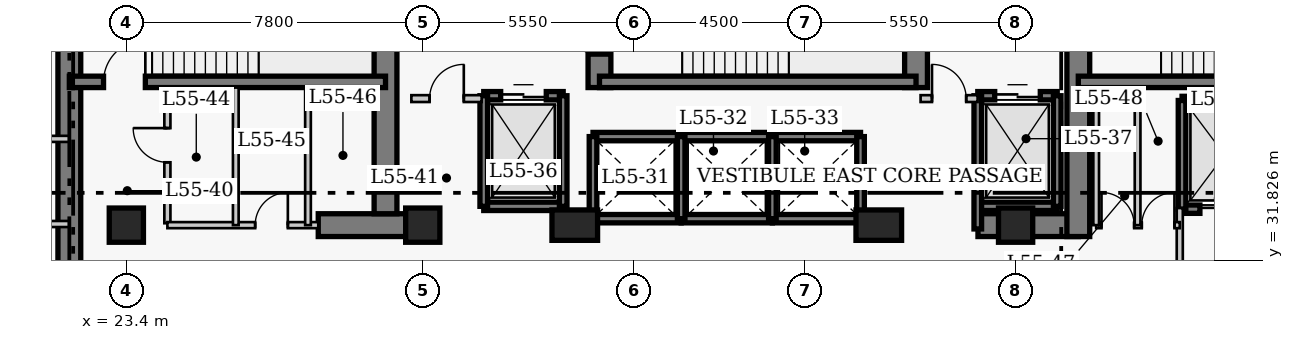
"""IFC4 building model, lengths in metres.
Left out: names, types, materials, properties, quantities, classifications, styles, units other than length and angle.
Written with IfcOpenShell. Run it as: python <this file> out.ifc"""

import sys

from ifc_helpers import new_model, si_unit, direction, frame, frame_2d, origin, origin_2d, place, context, subcontext, project, spatial, rectangle, extrude, element, fill, save


model = new_model("IFC4")
c1 = context("Model", 3, precision=1e-05, world=origin(), true_north=direction((0.0, 1.0)))
c2 = subcontext(c1, "Body", "Model", "MODEL_VIEW")
j1 = project(units=[si_unit("LENGTHUNIT", "METRE"), si_unit("PLANEANGLEUNIT", "RADIAN")], contexts=[c1])
p1 = place(None, origin())
s1 = spatial("IfcSite", under=j1, at=p1, CompositionType="ELEMENT")
p2 = place(p1, origin())
s2 = spatial("IfcBuilding", under=s1, at=p2, CompositionType="ELEMENT")
p3 = place(p2, frame((0.0, 0.0, 220.2)))
s3 = spatial("IfcBuildingStorey", under=s2, at=p3, CompositionType="ELEMENT", Elevation=220.2)
p4 = place(p3, frame((21.9, 27.05, 0.0), z_axis=(0.0, 0.0, 1.0), x_axis=(0.0, 1.0, 0.0)))
e1 = element("IfcWall", 1, at=p4, inside=s3, PredefinedType="SHEAR", context=c2, shape_type="SweptSolid", body=[
    extrude(rectangle(XDim=13.57, YDim=0.6, at=frame_2d((6.785, 0.0))), origin(), (0.0, 0.0, 1.0), 3.9),
])
p5 = place(p3, frame((28.45, 32.75, 0.0), z_axis=(0.0, 0.0, 1.0), x_axis=(1.0, 0.0, 0.0)))
e2 = element("IfcWall", 2, at=p5, inside=s3, PredefinedType="SHEAR", context=c2, shape_type="SweptSolid", body=[
    extrude(rectangle(XDim=2.4, YDim=0.6, at=frame_2d((1.2, 0.0))), origin(), (0.0, 0.0, 1.0), 3.9),
])
p6 = place(p3, frame((45.81, 32.75, 0.0), z_axis=(0.0, 0.0, 1.0), x_axis=(1.0, 0.0, 0.0)))
e3 = element("IfcWall", 3, at=p6, inside=s3, PredefinedType="SHEAR", context=c2, shape_type="SweptSolid", body=[
    extrude(rectangle(XDim=2.64, YDim=0.6, at=frame_2d((1.32, 0.0))), origin(), (0.0, 0.0, 1.0), 3.9),
])
p7 = place(p3, frame((30.22, 33.05, 0.0), z_axis=(0.0, 0.0, 1.0), x_axis=(0.0, 1.0, 0.0)))
e4 = element("IfcWall", 4, at=p7, inside=s3, PredefinedType="SHEAR", context=c2, shape_type="SweptSolid", body=[
    extrude(rectangle(XDim=7.27, YDim=0.6, at=frame_2d((3.635, 0.0))), origin(), (0.0, 0.0, 1.0), 3.9),
])
p8 = place(p3, frame((35.85, 36.37, 0.0), z_axis=(0.0, 0.0, 1.0), x_axis=(0.0, 1.0, 0.0)))
e5 = element("IfcWall", 5, at=p8, inside=s3, PredefinedType="SHEAR", context=c2, shape_type="SweptSolid", body=[
    extrude(rectangle(XDim=3.95, YDim=0.6, at=frame_2d((1.975, 0.0))), origin(), (0.0, 0.0, 1.0), 3.9),
])
p9 = place(p8, frame((0.88, 0.0, 0.0)))
e6 = element("IfcOpeningElement", 6, at=p9, cuts=e5, PredefinedType="OPENING", context=c2, shape_type="SweptSolid", body=[
    extrude(rectangle(XDim=1.1, YDim=2.15, at=frame_2d((0.55, 1.075))), frame((0.0, 0.31, 0.0), z_axis=(0.0, -1.0, 0.0), x_axis=(1.0, 0.0, 0.0)), (0.0, 0.0, 1.0), 0.62),
])
p10 = place(p3, frame((44.18, 36.37, 0.0), z_axis=(0.0, 0.0, 1.0), x_axis=(0.0, 1.0, 0.0)))
e7 = element("IfcWall", 7, at=p10, inside=s3, PredefinedType="SHEAR", context=c2, shape_type="SweptSolid", body=[
    extrude(rectangle(XDim=3.95, YDim=0.6, at=frame_2d((1.975, 0.0))), origin(), (0.0, 0.0, 1.0), 3.9),
])
p11 = place(p3, frame((48.45, 32.45, 0.0), z_axis=(0.0, 0.0, 1.0), x_axis=(0.0, 1.0, 0.0)))
e8 = element("IfcWall", 8, at=p11, inside=s3, PredefinedType="SHEAR", context=c2, shape_type="SweptSolid", body=[
    extrude(rectangle(XDim=7.87, YDim=0.6, at=frame_2d((3.935, 0.0))), origin(), (0.0, 0.0, 1.0), 3.9),
])
p12 = place(p11, frame((5.75, 0.0, 0.0)))
e9 = element("IfcOpeningElement", 9, at=p12, cuts=e8, PredefinedType="OPENING", context=c2, shape_type="SweptSolid", body=[
    extrude(rectangle(XDim=1.1, YDim=2.15, at=frame_2d((0.55, 1.075))), frame((0.0, 0.31, 0.0), z_axis=(0.0, -1.0, 0.0), x_axis=(1.0, 0.0, 0.0)), (0.0, 0.0, 1.0), 0.62),
])
p13 = place(p3, frame((21.9, 36.52, 0.0), z_axis=(0.0, 0.0, 1.0), x_axis=(1.0, 0.0, 0.0)))
e10 = element("IfcWall", 10, at=p13, inside=s3, PredefinedType="SHEAR", context=c2, shape_type="SweptSolid", body=[
    extrude(rectangle(XDim=8.32, YDim=0.3, at=frame_2d((4.16, 0.0))), origin(), (0.0, 0.0, 1.0), 3.9),
])
p14 = place(p13, frame((0.9, 0.0, 0.0)))
e11 = element("IfcOpeningElement", 11, at=p14, cuts=e10, PredefinedType="OPENING", context=c2, shape_type="SweptSolid", body=[
    extrude(rectangle(XDim=1.1, YDim=2.15, at=frame_2d((0.55, 1.075))), frame((0.0, 0.16, 0.0), z_axis=(0.0, -1.0, 0.0), x_axis=(1.0, 0.0, 0.0)), (0.0, 0.0, 1.0), 0.32),
])
p15 = place(p3, frame((35.85, 36.52, 0.0), z_axis=(0.0, 0.0, 1.0), x_axis=(1.0, 0.0, 0.0)))
e12 = element("IfcWall", 12, at=p15, inside=s3, PredefinedType="SHEAR", context=c2, shape_type="SweptSolid", body=[
    extrude(rectangle(XDim=8.33, YDim=0.3, at=frame_2d((4.165, 0.0))), origin(), (0.0, 0.0, 1.0), 3.9),
])
p16 = place(p3, frame((48.45, 36.52, 0.0), z_axis=(0.0, 0.0, 1.0), x_axis=(1.0, 0.0, 0.0)))
e13 = element("IfcWall", 13, at=p16, inside=s3, PredefinedType="SHEAR", context=c2, shape_type="SweptSolid", body=[
    extrude(rectangle(XDim=8.37, YDim=0.3, at=frame_2d((4.185, 0.0))), origin(), (0.0, 0.0, 1.0), 3.9),
])
for number, where, z_axis, x_axis in (
    (14, (23.4, 32.75, 0.0), (0.0, 0.0, 1.0), (1.0, 0.0, 0.0)),
    (15, (31.2, 32.75, 0.0), (0.0, 0.0, 1.0), (1.0, 0.0, 0.0)),
):
    element("IfcColumn", number, at=place(p3, frame(where, z_axis=z_axis, x_axis=x_axis)), inside=s3, PredefinedType="COLUMN", context=c2, shape_type="SweptSolid", body=[
        extrude(rectangle(XDim=0.9, YDim=0.9, at=origin_2d()), origin(), (0.0, 0.0, 1.0), 3.9),
    ])
for number, where, z_axis, x_axis in (
    (16, (35.2, 32.75, 0.0), (0.0, 0.0, 1.0), (1.0, 0.0, 0.0)),
    (17, (43.2, 32.75, 0.0), (0.0, 0.0, 1.0), (1.0, 0.0, 0.0)),
):
    element("IfcColumn", number, at=place(p3, frame(where, z_axis=z_axis, x_axis=x_axis)), inside=s3, PredefinedType="COLUMN", context=c2, shape_type="SweptSolid", body=[
        extrude(rectangle(XDim=1.2, YDim=0.8, at=origin_2d()), origin(), (0.0, 0.0, 1.0), 3.9),
    ])
p17 = place(p3, frame((46.8, 32.75, 0.0), z_axis=(0.0, 0.0, 1.0), x_axis=(1.0, 0.0, 0.0)))
e18 = element("IfcColumn", 18, at=p17, inside=s3, PredefinedType="COLUMN", context=c2, shape_type="SweptSolid", body=[
    extrude(rectangle(XDim=0.9, YDim=0.9, at=origin_2d()), origin(), (0.0, 0.0, 1.0), 3.9),
])
for number, where, z_axis, x_axis in (
    (19, (35.68, 35.08, 0.0), (0.0, 0.0, 1.0), (1.0, 0.0, 0.0)),
    (20, (35.68, 32.92, 0.0), (0.0, 0.0, 1.0), (1.0, 0.0, 0.0)),
):
    element("IfcWall", number, at=place(p3, frame(where, z_axis=z_axis, x_axis=x_axis)), inside=s3, PredefinedType="SHEAR", context=c2, shape_type="SweptSolid", body=[
        extrude(rectangle(XDim=2.32, YDim=0.22, at=frame_2d((1.16, 0.0))), origin(), (0.0, 0.0, 1.0), 3.9),
    ])
p18 = place(p3, frame((35.68, 32.92, 0.0), z_axis=(0.0, 0.0, 1.0), x_axis=(0.0, 1.0, 0.0)))
e21 = element("IfcWall", 21, at=p18, inside=s3, PredefinedType="SHEAR", context=c2, shape_type="SweptSolid", body=[
    extrude(rectangle(XDim=2.16, YDim=0.2, at=frame_2d((1.08, 0.0))), origin(), (0.0, 0.0, 1.0), 3.9),
])
for number, where, z_axis, x_axis in (
    (22, (38.0, 35.08, 0.0), (0.0, 0.0, 1.0), (1.0, 0.0, 0.0)),
    (23, (38.0, 32.92, 0.0), (0.0, 0.0, 1.0), (1.0, 0.0, 0.0)),
):
    element("IfcWall", number, at=place(p3, frame(where, z_axis=z_axis, x_axis=x_axis)), inside=s3, PredefinedType="SHEAR", context=c2, shape_type="SweptSolid", body=[
        extrude(rectangle(XDim=2.4, YDim=0.22, at=frame_2d((1.2, 0.0))), origin(), (0.0, 0.0, 1.0), 3.9),
    ])
p19 = place(p3, frame((38.0, 32.92, 0.0), z_axis=(0.0, 0.0, 1.0), x_axis=(0.0, 1.0, 0.0)))
e24 = element("IfcWall", 24, at=p19, inside=s3, PredefinedType="SHEAR", context=c2, shape_type="SweptSolid", body=[
    extrude(rectangle(XDim=2.16, YDim=0.2, at=frame_2d((1.08, 0.0))), origin(), (0.0, 0.0, 1.0), 3.9),
])
for number, where, z_axis, x_axis in (
    (25, (40.4, 35.08, 0.0), (0.0, 0.0, 1.0), (1.0, 0.0, 0.0)),
    (26, (40.4, 32.92, 0.0), (0.0, 0.0, 1.0), (1.0, 0.0, 0.0)),
):
    element("IfcWall", number, at=place(p3, frame(where, z_axis=z_axis, x_axis=x_axis)), inside=s3, PredefinedType="SHEAR", context=c2, shape_type="SweptSolid", body=[
        extrude(rectangle(XDim=2.32, YDim=0.22, at=frame_2d((1.16, 0.0))), origin(), (0.0, 0.0, 1.0), 3.9),
    ])
for number, where, z_axis, x_axis in (
    (27, (40.4, 32.92, 0.0), (0.0, 0.0, 1.0), (0.0, 1.0, 0.0)),
    (28, (42.72, 32.92, 0.0), (0.0, 0.0, 1.0), (0.0, 1.0, 0.0)),
):
    element("IfcWall", number, at=place(p3, frame(where, z_axis=z_axis, x_axis=x_axis)), inside=s3, PredefinedType="SHEAR", context=c2, shape_type="SweptSolid", body=[
        extrude(rectangle(XDim=2.16, YDim=0.2, at=frame_2d((1.08, 0.0))), origin(), (0.0, 0.0, 1.0), 3.9),
    ])
p20 = place(p3, frame((51.18, 36.03, 0.0), z_axis=(0.0, 0.0, 1.0), x_axis=(1.0, 0.0, 0.0)))
e29 = element("IfcWall", 29, at=p20, inside=s3, PredefinedType="SHEAR", context=c2, shape_type="SweptSolid", body=[
    extrude(rectangle(XDim=2.42, YDim=0.22, at=frame_2d((1.21, 0.0))), origin(), (0.0, 0.0, 1.0), 3.9),
])
p21 = place(p3, frame((51.18, 33.17, 0.0), z_axis=(0.0, 0.0, 1.0), x_axis=(1.0, 0.0, 0.0)))
e30 = element("IfcWall", 30, at=p21, inside=s3, PredefinedType="SHEAR", context=c2, shape_type="SweptSolid", body=[
    extrude(rectangle(XDim=2.42, YDim=0.22, at=frame_2d((1.21, 0.0))), origin(), (0.0, 0.0, 1.0), 3.9),
])
p22 = place(p21, frame((0.47, 0.0, 0.0)))
e31 = element("IfcOpeningElement", 31, at=p22, cuts=e30, PredefinedType="OPENING", context=c2, shape_type="SweptSolid", body=[
    extrude(rectangle(XDim=1.3, YDim=2.15, at=frame_2d((0.65, 1.075))), frame((0.0, 0.12, 0.0), z_axis=(0.0, -1.0, 0.0), x_axis=(1.0, 0.0, 0.0)), (0.0, 0.0, 1.0), 0.24),
])
p23 = place(p3, frame((51.18, 33.17, 0.0), z_axis=(0.0, 0.0, 1.0), x_axis=(0.0, 1.0, 0.0)))
e32 = element("IfcWall", 32, at=p23, inside=s3, PredefinedType="SHEAR", context=c2, shape_type="SweptSolid", body=[
    extrude(rectangle(XDim=2.86, YDim=0.2, at=frame_2d((1.43, 0.0))), origin(), (0.0, 0.0, 1.0), 3.9),
])
p24 = place(p3, frame((32.805, 36.155, 0.0), z_axis=(0.0, 0.0, 1.0), x_axis=(1.0, 0.0, 0.0)))
e33 = element("IfcWall", 33, at=p24, inside=s3, PredefinedType="SHEAR", context=c2, shape_type="SweptSolid", body=[
    extrude(rectangle(XDim=2.09, YDim=0.22, at=frame_2d((1.045, 0.0))), origin(), (0.0, 0.0, 1.0), 3.9),
])
p25 = place(p24, frame((0.445, 0.0, 0.0)))
e34 = element("IfcOpeningElement", 34, at=p25, cuts=e33, PredefinedType="OPENING", context=c2, shape_type="SweptSolid", body=[
    extrude(rectangle(XDim=1.2, YDim=2.15, at=frame_2d((0.6, 1.075))), frame((0.0, 0.12, 0.0), z_axis=(0.0, -1.0, 0.0), x_axis=(1.0, 0.0, 0.0)), (0.0, 0.0, 1.0), 0.24),
])
p26 = place(p3, frame((32.805, 33.245, 0.0), z_axis=(0.0, 0.0, 1.0), x_axis=(1.0, 0.0, 0.0)))
e35 = element("IfcWall", 35, at=p26, inside=s3, PredefinedType="SHEAR", context=c2, shape_type="SweptSolid", body=[
    extrude(rectangle(XDim=2.09, YDim=0.22, at=frame_2d((1.045, 0.0))), origin(), (0.0, 0.0, 1.0), 3.9),
])
for number, where, z_axis, x_axis in (
    (36, (32.805, 33.245, 0.0), (0.0, 0.0, 1.0), (0.0, 1.0, 0.0)),
    (37, (34.895, 33.245, 0.0), (0.0, 0.0, 1.0), (0.0, 1.0, 0.0)),
):
    element("IfcWall", number, at=place(p3, frame(where, z_axis=z_axis, x_axis=x_axis)), inside=s3, PredefinedType="SHEAR", context=c2, shape_type="SweptSolid", body=[
        extrude(rectangle(XDim=2.91, YDim=0.2, at=frame_2d((1.455, 0.0))), origin(), (0.0, 0.0, 1.0), 3.9),
    ])
p27 = place(p3, frame((45.805, 36.155, 0.0), z_axis=(0.0, 0.0, 1.0), x_axis=(1.0, 0.0, 0.0)))
e38 = element("IfcWall", 38, at=p27, inside=s3, PredefinedType="SHEAR", context=c2, shape_type="SweptSolid", body=[
    extrude(rectangle(XDim=2.09, YDim=0.22, at=frame_2d((1.045, 0.0))), origin(), (0.0, 0.0, 1.0), 3.9),
])
p28 = place(p27, frame((0.445, 0.0, 0.0)))
e39 = element("IfcOpeningElement", 39, at=p28, cuts=e38, PredefinedType="OPENING", context=c2, shape_type="SweptSolid", body=[
    extrude(rectangle(XDim=1.2, YDim=2.15, at=frame_2d((0.6, 1.075))), frame((0.0, 0.12, 0.0), z_axis=(0.0, -1.0, 0.0), x_axis=(1.0, 0.0, 0.0)), (0.0, 0.0, 1.0), 0.24),
])
p29 = place(p3, frame((45.805, 33.245, 0.0), z_axis=(0.0, 0.0, 1.0), x_axis=(1.0, 0.0, 0.0)))
e40 = element("IfcWall", 40, at=p29, inside=s3, PredefinedType="SHEAR", context=c2, shape_type="SweptSolid", body=[
    extrude(rectangle(XDim=2.09, YDim=0.22, at=frame_2d((1.045, 0.0))), origin(), (0.0, 0.0, 1.0), 3.9),
])
p30 = place(p3, frame((45.805, 32.65, 0.0), z_axis=(0.0, 0.0, 1.0), x_axis=(0.0, 1.0, 0.0)))
e41 = element("IfcWall", 41, at=p30, inside=s3, PredefinedType="SHEAR", context=c2, shape_type="SweptSolid", body=[
    extrude(rectangle(XDim=3.505, YDim=0.2, at=frame_2d((1.752, 0.0))), origin(), (0.0, 0.0, 1.0), 3.9),
])
p31 = place(p3, frame((47.895, 33.245, 0.0), z_axis=(0.0, 0.0, 1.0), x_axis=(0.0, 1.0, 0.0)))
e42 = element("IfcWall", 42, at=p31, inside=s3, PredefinedType="SHEAR", context=c2, shape_type="SweptSolid", body=[
    extrude(rectangle(XDim=2.91, YDim=0.2, at=frame_2d((1.455, 0.0))), origin(), (0.0, 0.0, 1.0), 3.9),
])
p32 = place(p3, frame((30.9, 36.08, 0.0), z_axis=(0.0, 0.0, 1.0), x_axis=(1.0, 0.0, 0.0)))
e43 = element("IfcWall", 43, at=p32, inside=s3, PredefinedType="PARTITIONING", context=c2, shape_type="SweptSolid", body=[
    extrude(rectangle(XDim=1.85, YDim=0.18, at=frame_2d((0.925, 0.0))), origin(), (0.0, 0.0, 1.0), 3.65),
])
p33 = place(p32, frame((0.48, 0.0, 0.0)))
e44 = element("IfcOpeningElement", 44, at=p33, cuts=e43, PredefinedType="OPENING", context=c2, shape_type="SweptSolid", body=[
    extrude(rectangle(XDim=0.9, YDim=2.15, at=frame_2d((0.45, 1.075))), frame((0.0, 0.1, 0.0), z_axis=(0.0, -1.0, 0.0), x_axis=(1.0, 0.0, 0.0)), (0.0, 0.0, 1.0), 0.2),
])
p34 = place(p3, frame((44.3, 36.08, 0.0), z_axis=(0.0, 0.0, 1.0), x_axis=(1.0, 0.0, 0.0)))
e45 = element("IfcWall", 45, at=p34, inside=s3, PredefinedType="PARTITIONING", context=c2, shape_type="SweptSolid", body=[
    extrude(rectangle(XDim=1.5, YDim=0.18, at=frame_2d((0.75, 0.0))), origin(), (0.0, 0.0, 1.0), 3.65),
])
p35 = place(p34, frame((0.3, 0.0, 0.0)))
e46 = element("IfcOpeningElement", 46, at=p35, cuts=e45, PredefinedType="OPENING", context=c2, shape_type="SweptSolid", body=[
    extrude(rectangle(XDim=0.9, YDim=2.15, at=frame_2d((0.45, 1.075))), frame((0.0, 0.1, 0.0), z_axis=(0.0, -1.0, 0.0), x_axis=(1.0, 0.0, 0.0)), (0.0, 0.0, 1.0), 0.2),
])
p36 = place(p3, frame((24.48, 32.8, 0.0), z_axis=(0.0, 0.0, 1.0), x_axis=(0.0, 1.0, 0.0)))
e47 = element("IfcWall", 47, at=p36, inside=s3, PredefinedType="PARTITIONING", context=c2, shape_type="SweptSolid", body=[
    extrude(rectangle(XDim=3.57, YDim=0.16, at=frame_2d((1.785, 0.0))), origin(), (0.0, 0.0, 1.0), 3.65),
])
p37 = place(p36, frame((1.604, 0.0, 0.0)))
e48 = element("IfcOpeningElement", 48, at=p37, cuts=e47, PredefinedType="OPENING", context=c2, shape_type="SweptSolid", body=[
    extrude(rectangle(XDim=0.9, YDim=2.1, at=frame_2d((0.45, 1.05))), frame((0.0, 0.09, 0.0), z_axis=(0.0, -1.0, 0.0), x_axis=(1.0, 0.0, 0.0)), (0.0, 0.0, 1.0), 0.18),
])
p38 = place(p3, frame((51.12, 29.5, 0.0), z_axis=(0.0, 0.0, 1.0), x_axis=(0.0, 1.0, 0.0)))
e49 = element("IfcWall", 49, at=p38, inside=s3, PredefinedType="PARTITIONING", context=c2, shape_type="SweptSolid", body=[
    extrude(rectangle(XDim=3.7, YDim=0.16, at=frame_2d((1.85, 0.0))), origin(), (0.0, 0.0, 1.0), 3.65),
])
p39 = place(p38, frame((0.9, 0.0, 0.0)))
e50 = element("IfcOpeningElement", 50, at=p39, cuts=e49, PredefinedType="OPENING", context=c2, shape_type="SweptSolid", body=[
    extrude(rectangle(XDim=1.1, YDim=2.15, at=frame_2d((0.55, 1.075))), frame((0.0, 0.09, 0.0), z_axis=(0.0, -1.0, 0.0), x_axis=(1.0, 0.0, 0.0)), (0.0, 0.0, 1.0), 0.18),
])
p40 = place(p3, frame((24.48, 32.75, 0.0), z_axis=(0.0, 0.0, 1.0), x_axis=(1.0, 0.0, 0.0)))
e51 = element("IfcWall", 51, at=p40, inside=s3, PredefinedType="PARTITIONING", context=c2, shape_type="SweptSolid", body=[
    extrude(rectangle(XDim=3.97, YDim=0.16, at=frame_2d((1.985, 0.0))), origin(), (0.0, 0.0, 1.0), 3.65),
])
p41 = place(p40, frame((2.31, 0.0, 0.0)))
e52 = element("IfcOpeningElement", 52, at=p41, cuts=e51, PredefinedType="OPENING", context=c2, shape_type="SweptSolid", body=[
    extrude(rectangle(XDim=0.86, YDim=2.05, at=frame_2d((0.43, 1.025))), frame((0.0, 0.09, 0.0), z_axis=(0.0, -1.0, 0.0), x_axis=(1.0, 0.0, 0.0)), (0.0, 0.0, 1.0), 0.18),
])
p42 = place(p3, frame((48.92, 32.75, 0.0), z_axis=(0.0, 0.0, 1.0), x_axis=(1.0, 0.0, 0.0)))
e53 = element("IfcWall", 53, at=p42, inside=s3, PredefinedType="PARTITIONING", context=c2, shape_type="SweptSolid", body=[
    extrude(rectangle(XDim=2.2, YDim=0.16, at=frame_2d((1.1, 0.0))), origin(), (0.0, 0.0, 1.0), 3.65),
])
p43 = place(p42, frame((0.14, 0.0, 0.0)))
e54 = element("IfcOpeningElement", 54, at=p43, cuts=e53, PredefinedType="OPENING", context=c2, shape_type="SweptSolid", body=[
    extrude(rectangle(XDim=0.86, YDim=2.05, at=frame_2d((0.43, 1.025))), frame((0.0, 0.09, 0.0), z_axis=(0.0, -1.0, 0.0), x_axis=(1.0, 0.0, 0.0)), (0.0, 0.0, 1.0), 0.18),
])
p44 = place(p42, frame((1.2, 0.0, 0.0)))
e55 = element("IfcOpeningElement", 55, at=p44, cuts=e53, PredefinedType="OPENING", context=c2, shape_type="SweptSolid", body=[
    extrude(rectangle(XDim=0.86, YDim=2.05, at=frame_2d((0.43, 1.025))), frame((0.0, 0.09, 0.0), z_axis=(0.0, -1.0, 0.0), x_axis=(1.0, 0.0, 0.0)), (0.0, 0.0, 1.0), 0.18),
])
for number, where, z_axis, x_axis in (
    (56, (48.92, 32.75, 0.0), (0.0, 0.0, 1.0), (0.0, 1.0, 0.0)),
    (57, (26.28, 32.75, 0.0), (0.0, 0.0, 1.0), (0.0, 1.0, 0.0)),
    (58, (28.18, 32.75, 0.0), (0.0, 0.0, 1.0), (0.0, 1.0, 0.0)),
    (59, (50.01, 32.75, 0.0), (0.0, 0.0, 1.0), (0.0, 1.0, 0.0)),
):
    element("IfcWall", number, at=place(p3, frame(where, z_axis=z_axis, x_axis=x_axis)), inside=s3, PredefinedType="PARTITIONING", context=c2, shape_type="SweptSolid", body=[
        extrude(rectangle(XDim=3.62, YDim=0.15, at=frame_2d((1.81, 0.0))), origin(), (0.0, 0.0, 1.0), 3.65),
    ])
for number, where, z_axis, x_axis in (
    (60, (18.86, 35.02, 0.0), (0.0, 0.0, 1.0), (1.0, 0.0, 0.0)),
    (61, (18.86, 32.78, 0.0), (0.0, 0.0, 1.0), (1.0, 0.0, 0.0)),
):
    element("IfcWall", number, at=place(p3, frame(where, z_axis=z_axis, x_axis=x_axis)), inside=s3, PredefinedType="PARTITIONING", context=c2, shape_type="SweptSolid", body=[
        extrude(rectangle(XDim=3.04, YDim=0.16, at=frame_2d((1.52, 0.0))), origin(), (0.0, 0.0, 1.0), 3.65),
    ])
p45 = place(p22, origin())
e62 = element("IfcDoor", 62, at=p45, inside=s3, OperationType="DOUBLE_DOOR_SLIDING", PredefinedType="DOOR", context=c2, shape_type="SweptSolid", body=[
    extrude(rectangle(XDim=1.3, YDim=2.15, at=frame_2d((0.65, 1.075))), frame((0.0, 0.025, 0.0), z_axis=(0.0, -1.0, 0.0), x_axis=(1.0, 0.0, 0.0)), (0.0, 0.0, 1.0), 0.05),
])
fill(e31, e62)
p46 = place(p25, origin())
e63 = element("IfcDoor", 63, at=p46, inside=s3, OperationType="DOUBLE_DOOR_SLIDING", PredefinedType="DOOR", context=c2, shape_type="SweptSolid", body=[
    extrude(rectangle(XDim=1.2, YDim=2.15, at=frame_2d((0.6, 1.075))), frame((0.0, 0.025, 0.0), z_axis=(0.0, -1.0, 0.0), x_axis=(1.0, 0.0, 0.0)), (0.0, 0.0, 1.0), 0.05),
])
fill(e34, e63)
p47 = place(p28, origin())
e64 = element("IfcDoor", 64, at=p47, inside=s3, OperationType="DOUBLE_DOOR_SLIDING", PredefinedType="DOOR", context=c2, shape_type="SweptSolid", body=[
    extrude(rectangle(XDim=1.2, YDim=2.15, at=frame_2d((0.6, 1.075))), frame((0.0, 0.025, 0.0), z_axis=(0.0, -1.0, 0.0), x_axis=(1.0, 0.0, 0.0)), (0.0, 0.0, 1.0), 0.05),
])
fill(e39, e64)
p48 = place(p33, origin())
e65 = element("IfcDoor", 65, at=p48, inside=s3, OperationType="SINGLE_SWING_RIGHT", PredefinedType="DOOR", context=c2, shape_type="SweptSolid", body=[
    extrude(rectangle(XDim=0.9, YDim=2.15, at=frame_2d((0.45, 1.075))), frame((0.0, 0.025, 0.0), z_axis=(0.0, -1.0, 0.0), x_axis=(1.0, 0.0, 0.0)), (0.0, 0.0, 1.0), 0.05),
])
fill(e44, e65)
p49 = place(p35, origin())
e66 = element("IfcDoor", 66, at=p49, inside=s3, OperationType="SINGLE_SWING_LEFT", PredefinedType="DOOR", context=c2, shape_type="SweptSolid", body=[
    extrude(rectangle(XDim=0.9, YDim=2.15, at=frame_2d((0.45, 1.075))), frame((0.0, 0.025, 0.0), z_axis=(0.0, -1.0, 0.0), x_axis=(1.0, 0.0, 0.0)), (0.0, 0.0, 1.0), 0.05),
])
fill(e46, e66)
p50 = place(p37, origin())
e67 = element("IfcDoor", 67, at=p50, inside=s3, OperationType="SINGLE_SWING_RIGHT", PredefinedType="DOOR", context=c2, shape_type="SweptSolid", body=[
    extrude(rectangle(XDim=0.9, YDim=2.1, at=frame_2d((0.45, 1.05))), frame((0.0, 0.025, 0.0), z_axis=(0.0, -1.0, 0.0), x_axis=(1.0, 0.0, 0.0)), (0.0, 0.0, 1.0), 0.05),
])
fill(e48, e67)
p51 = place(p41, origin())
e68 = element("IfcDoor", 68, at=p51, inside=s3, OperationType="SINGLE_SWING_RIGHT", PredefinedType="DOOR", context=c2, shape_type="SweptSolid", body=[
    extrude(rectangle(XDim=0.86, YDim=2.05, at=frame_2d((0.43, 1.025))), frame((0.0, 0.025, 0.0), z_axis=(0.0, -1.0, 0.0), x_axis=(1.0, 0.0, 0.0)), (0.0, 0.0, 1.0), 0.05),
])
fill(e52, e68)
p52 = place(p43, origin())
e69 = element("IfcDoor", 69, at=p52, inside=s3, OperationType="SINGLE_SWING_LEFT", PredefinedType="DOOR", context=c2, shape_type="SweptSolid", body=[
    extrude(rectangle(XDim=0.86, YDim=2.05, at=frame_2d((0.43, 1.025))), frame((0.0, 0.025, 0.0), z_axis=(0.0, -1.0, 0.0), x_axis=(1.0, 0.0, 0.0)), (0.0, 0.0, 1.0), 0.05),
])
fill(e54, e69)
p53 = place(p44, origin())
e70 = element("IfcDoor", 70, at=p53, inside=s3, OperationType="SINGLE_SWING_RIGHT", PredefinedType="DOOR", context=c2, shape_type="SweptSolid", body=[
    extrude(rectangle(XDim=0.86, YDim=2.05, at=frame_2d((0.43, 1.025))), frame((0.0, 0.025, 0.0), z_axis=(0.0, -1.0, 0.0), x_axis=(1.0, 0.0, 0.0)), (0.0, 0.0, 1.0), 0.05),
])
fill(e55, e70)
p54 = place(p14, origin())
e71 = element("IfcDoor", 71, at=p54, inside=s3, OperationType="SINGLE_SWING_RIGHT", PredefinedType="DOOR", context=c2, shape_type="SweptSolid", body=[
    extrude(rectangle(XDim=1.1, YDim=2.15, at=frame_2d((0.55, 1.075))), frame((0.0, 0.025, 0.0), z_axis=(0.0, -1.0, 0.0), x_axis=(1.0, 0.0, 0.0)), (0.0, 0.0, 1.0), 0.05),
])
fill(e11, e71)
p55 = place(p9, origin())
e72 = element("IfcDoor", 72, at=p55, inside=s3, OperationType="SINGLE_SWING_RIGHT", PredefinedType="DOOR", context=c2, shape_type="SweptSolid", body=[
    extrude(rectangle(XDim=1.1, YDim=2.15, at=frame_2d((0.55, 1.075))), frame((0.0, 0.025, 0.0), z_axis=(0.0, -1.0, 0.0), x_axis=(1.0, 0.0, 0.0)), (0.0, 0.0, 1.0), 0.05),
])
fill(e6, e72)
save(model, sys.argv[1])
